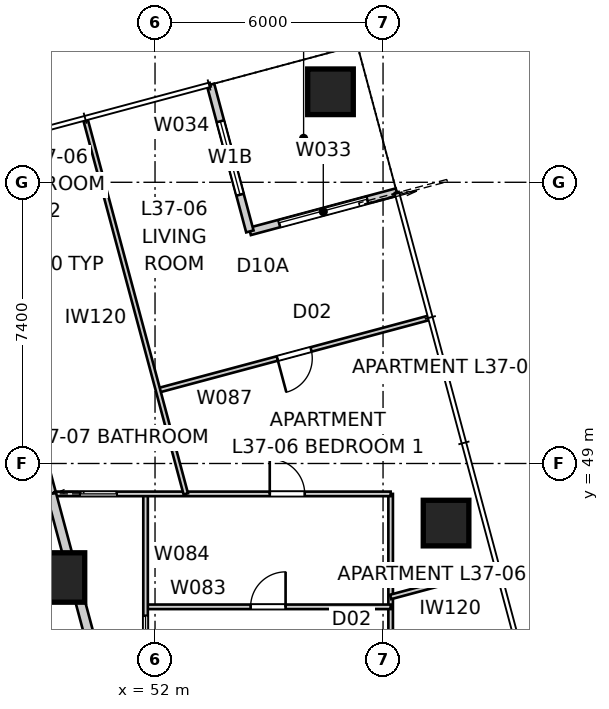
"""IFC4 building model, lengths in metres.
Left out: names, types, materials, properties, quantities, classifications, styles, units other than length and angle.
Written with IfcOpenShell. Run it as: python <this file> out.ifc"""

import sys

from ifc_helpers import new_model, si_unit, direction, frame, frame_2d, origin, origin_2d, place, context, subcontext, project, spatial, rectangle, extrude, element, fill, save


model = new_model("IFC4")
c1 = context("Model", 3, precision=1e-05, world=origin(), true_north=direction((0.0, 1.0)))
c2 = subcontext(c1, "Body", "Model", "MODEL_VIEW")
j1 = project(units=[si_unit("LENGTHUNIT", "METRE"), si_unit("PLANEANGLEUNIT", "RADIAN")], contexts=[c1])
p1 = place(None, origin())
s1 = spatial("IfcSite", under=j1, at=p1, CompositionType="ELEMENT")
p2 = place(p1, origin())
s2 = spatial("IfcBuilding", under=s1, at=p2, CompositionType="ELEMENT")
p3 = place(p2, frame((0.0, 0.0, 135.4)))
s3 = spatial("IfcBuildingStorey", under=s2, at=p3, CompositionType="ELEMENT", Elevation=135.4)
for number, where, z_axis, x_axis in (
    (1, (59.658, 47.432, 0.0), (0.0, 0.0, 1.0), (1.0, 0.0, 0.0)),
    (2, (56.617, 58.781, 0.0), (0.0, 0.0, 1.0), (1.0, 0.0, 0.0)),
):
    element("IfcColumn", number, at=place(p3, frame(where, z_axis=z_axis, x_axis=x_axis)), inside=s3, PredefinedType="COLUMN", context=c2, shape_type="SweptSolid", body=[
        extrude(rectangle(XDim=1.2, YDim=1.2, at=origin_2d()), origin(), (0.0, 0.0, 1.0), 3.2),
    ])
p4 = place(p3, frame((49.5, 46.0, 0.0), z_axis=(0.0, 0.0, 1.0), x_axis=(1.0, 0.0, 0.0)))
e3 = element("IfcColumn", 3, at=p4, inside=s3, PredefinedType="COLUMN", context=c2, shape_type="SweptSolid", body=[
    extrude(rectangle(XDim=1.3, YDim=1.3, at=origin_2d()), origin(), (0.0, 0.0, 1.0), 3.4),
])
p5 = place(p3, frame((58.359, 56.143, 0.0), z_axis=(0.0, 0.0, 1.0), x_axis=(-0.965919172068, -0.258843877716, 0.0)))
e4 = element("IfcWall", 4, at=p5, inside=s3, PredefinedType="SOLIDWALL", context=c2, shape_type="SweptSolid", body=[
    extrude(rectangle(XDim=4.0, YDim=0.2, at=frame_2d((2.0, 0.0))), origin(), (0.0, 0.0, 1.0), 3.2),
])
p6 = place(p5, frame((0.8, 0.0, 0.0)))
e5 = element("IfcOpeningElement", 5, at=p6, cuts=e4, PredefinedType="OPENING", context=c2, shape_type="SweptSolid", body=[
    extrude(rectangle(XDim=2.4, YDim=2.1, at=frame_2d((1.2, 1.05))), frame((0.0, 0.11, 0.0), z_axis=(0.0, -1.0, 0.0), x_axis=(1.0, 0.0, 0.0)), (0.0, 0.0, 1.0), 0.22),
])
p7 = place(p3, frame((54.496, 55.107, 0.0), z_axis=(0.0, 0.0, 1.0), x_axis=(-0.258786931944, 0.965934430412, 0.0)))
e6 = element("IfcWall", 6, at=p7, inside=s3, PredefinedType="SOLIDWALL", context=c2, shape_type="SweptSolid", body=[
    extrude(rectangle(XDim=4.0, YDim=0.2, at=frame_2d((2.0, 0.0))), origin(), (0.0, 0.0, 1.0), 3.2),
])
p8 = place(p7, frame((1.0, 0.0, 0.4)))
e7 = element("IfcOpeningElement", 7, at=p8, cuts=e6, PredefinedType="OPENING", context=c2, shape_type="SweptSolid", body=[
    extrude(rectangle(XDim=2.0, YDim=1.8, at=frame_2d((1.0, 0.9))), frame((0.0, 0.11, 0.0), z_axis=(0.0, -1.0, 0.0), x_axis=(1.0, 0.0, 0.0)), (0.0, 0.0, 1.0), 0.22),
])
p9 = place(p3, frame((47.119, 56.237, 0.0), z_axis=(0.0, 0.0, 1.0), x_axis=(0.258819249667, -0.965925771476, 0.0)))
e8 = element("IfcWall", 8, at=p9, inside=s3, PredefinedType="PARTITIONING", context=c2, shape_type="SweptSolid", body=[
    extrude(rectangle(XDim=8.315, YDim=0.25, at=frame_2d((4.158, 0.0))), origin(), (0.0, 0.0, 1.0), 2.588),
])
p10 = place(p3, frame((49.271, 48.205, 0.0), z_axis=(0.0, 0.0, 1.0), x_axis=(0.258853660469, -0.965916550465, 0.0)))
e9 = element("IfcWall", 9, at=p10, inside=s3, PredefinedType="PARTITIONING", context=c2, shape_type="SweptSolid", body=[
    extrude(rectangle(XDim=4.567, YDim=0.25, at=frame_2d((2.283, 0.0))), origin(), (0.0, 0.0, 1.0), 3.2),
])
p11 = place(p3, frame((58.2, 48.2, 0.0), z_axis=(0.0, 0.0, 1.0), x_axis=(0.0, -1.0, 0.0)))
e10 = element("IfcWall", 10, at=p11, inside=s3, PredefinedType="PARTITIONING", context=c2, shape_type="SweptSolid", body=[
    extrude(rectangle(XDim=33.512, YDim=0.12, at=frame_2d((16.756, 0.0))), origin(), (0.0, 0.0, 1.0), 2.399),
])
p12 = place(p11, frame((11.441, 0.0, 0.0)))
e11 = element("IfcOpeningElement", 11, at=p12, cuts=e10, PredefinedType="OPENING", context=c2, shape_type="SweptSolid", body=[
    extrude(rectangle(XDim=0.92, YDim=2.34, at=frame_2d((0.46, 1.17))), frame((0.0, 0.07, 0.0), z_axis=(0.0, -1.0, 0.0), x_axis=(1.0, 0.0, 0.0)), (0.0, 0.0, 1.0), 0.14),
])
p13 = place(p11, frame((7.583, 0.0, 0.0)))
e12 = element("IfcOpeningElement", 12, at=p13, cuts=e10, PredefinedType="OPENING", context=c2, shape_type="SweptSolid", body=[
    extrude(rectangle(XDim=0.92, YDim=2.34, at=frame_2d((0.46, 1.17))), frame((0.0, 0.07, 0.0), z_axis=(0.0, -1.0, 0.0), x_axis=(1.0, 0.0, 0.0)), (0.0, 0.0, 1.0), 0.14),
])
p14 = place(p11, frame((25.269, 0.0, 0.0)))
e13 = element("IfcOpeningElement", 13, at=p14, cuts=e10, PredefinedType="OPENING", context=c2, shape_type="SweptSolid", body=[
    extrude(rectangle(XDim=0.92, YDim=2.34, at=frame_2d((0.46, 1.17))), frame((0.0, 0.07, 0.0), z_axis=(0.0, -1.0, 0.0), x_axis=(1.0, 0.0, 0.0)), (0.0, 0.0, 1.0), 0.14),
])
p15 = place(p11, frame((28.662, 0.0, 0.0)))
e14 = element("IfcOpeningElement", 14, at=p15, cuts=e10, PredefinedType="OPENING", context=c2, shape_type="SweptSolid", body=[
    extrude(rectangle(XDim=0.92, YDim=2.34, at=frame_2d((0.46, 1.17))), frame((0.0, 0.07, 0.0), z_axis=(0.0, -1.0, 0.0), x_axis=(1.0, 0.0, 0.0)), (0.0, 0.0, 1.0), 0.14),
])
p16 = place(p11, frame((4.15, 0.0, 0.0)))
e15 = element("IfcOpeningElement", 15, at=p16, cuts=e10, PredefinedType="OPENING", context=c2, shape_type="SweptSolid", body=[
    extrude(rectangle(XDim=0.92, YDim=2.34, at=frame_2d((0.46, 1.17))), frame((0.0, 0.07, 0.0), z_axis=(0.0, -1.0, 0.0), x_axis=(1.0, 0.0, 0.0)), (0.0, 0.0, 1.0), 0.14),
])
p17 = place(p3, frame((51.751, 45.228, 0.0), z_axis=(0.0, 0.0, 1.0), x_axis=(1.0, 0.0, 0.0)))
e16 = element("IfcWall", 16, at=p17, inside=s3, PredefinedType="PARTITIONING", context=c2, shape_type="SweptSolid", body=[
    extrude(rectangle(XDim=6.449, YDim=0.12, at=frame_2d((3.225, 0.0))), origin(), (0.0, 0.0, 1.0), 3.2),
])
p18 = place(p17, frame((2.764, 0.0, 0.0)))
e17 = element("IfcOpeningElement", 17, at=p18, cuts=e16, PredefinedType="OPENING", context=c2, shape_type="SweptSolid", body=[
    extrude(rectangle(XDim=0.92, YDim=2.34, at=frame_2d((0.46, 1.17))), frame((0.0, 0.07, 0.0), z_axis=(0.0, -1.0, 0.0), x_axis=(1.0, 0.0, 0.0)), (0.0, 0.0, 1.0), 0.14),
])
p19 = place(p3, frame((51.751, 43.8, 0.0), z_axis=(0.0, 0.0, 1.0), x_axis=(0.0, 1.0, 0.0)))
e18 = element("IfcWall", 18, at=p19, inside=s3, PredefinedType="PARTITIONING", context=c2, shape_type="SweptSolid", body=[
    extrude(rectangle(XDim=4.4, YDim=0.12, at=frame_2d((2.2, 0.0))), origin(), (0.0, 0.0, 1.0), 3.2),
])
p20 = place(p19, frame((0.234, 0.0, 0.0)))
e19 = element("IfcOpeningElement", 19, at=p20, cuts=e18, PredefinedType="OPENING", context=c2, shape_type="SweptSolid", body=[
    extrude(rectangle(XDim=0.96, YDim=2.0, at=frame_2d((0.48, 1.0))), frame((0.0, 0.07, 0.0), z_axis=(0.0, -1.0, 0.0), x_axis=(1.0, 0.0, 0.0)), (0.0, 0.0, 1.0), 0.14),
])
p21 = place(p3, frame((26.657, 48.2, 0.0), z_axis=(0.0, 0.0, 1.0), x_axis=(1.0, 0.0, 0.0)))
e20 = element("IfcWall", 20, at=p21, inside=s3, PredefinedType="PARTITIONING", context=c2, shape_type="SweptSolid", body=[
    extrude(rectangle(XDim=31.543, YDim=0.12, at=frame_2d((15.771, 0.0))), origin(), (0.0, 0.0, 1.0), 2.399),
])
p22 = place(p21, frame((13.4, 0.0, 0.0)))
e21 = element("IfcOpeningElement", 21, at=p22, cuts=e20, PredefinedType="OPENING", context=c2, shape_type="SweptSolid", body=[
    extrude(rectangle(XDim=0.92, YDim=2.34, at=frame_2d((0.46, 1.17))), frame((0.0, 0.07, 0.0), z_axis=(0.0, -1.0, 0.0), x_axis=(1.0, 0.0, 0.0)), (0.0, 0.0, 1.0), 0.14),
])
p23 = place(p21, frame((20.723, 0.0, 0.0)))
e22 = element("IfcOpeningElement", 22, at=p23, cuts=e20, PredefinedType="OPENING", context=c2, shape_type="SweptSolid", body=[
    extrude(rectangle(XDim=0.92, YDim=2.34, at=frame_2d((0.46, 1.17))), frame((0.0, 0.07, 0.0), z_axis=(0.0, -1.0, 0.0), x_axis=(1.0, 0.0, 0.0)), (0.0, 0.0, 1.0), 0.14),
])
p24 = place(p21, frame((10.117, 0.0, 0.0)))
e23 = element("IfcOpeningElement", 23, at=p24, cuts=e20, PredefinedType="OPENING", context=c2, shape_type="SweptSolid", body=[
    extrude(rectangle(XDim=0.96, YDim=2.1, at=frame_2d((0.48, 1.05))), frame((0.0, 0.07, 0.0), z_axis=(0.0, -1.0, 0.0), x_axis=(1.0, 0.0, 0.0)), (0.0, 0.0, 1.0), 0.14),
])
p25 = place(p21, frame((28.362, 0.0, 0.0)))
e24 = element("IfcOpeningElement", 24, at=p25, cuts=e20, PredefinedType="OPENING", context=c2, shape_type="SweptSolid", body=[
    extrude(rectangle(XDim=0.92, YDim=2.34, at=frame_2d((0.46, 1.17))), frame((0.0, 0.07, 0.0), z_axis=(0.0, -1.0, 0.0), x_axis=(1.0, 0.0, 0.0)), (0.0, 0.0, 1.0), 0.14),
])
p26 = place(p21, frame((23.375, 0.0, 0.0)))
e25 = element("IfcOpeningElement", 25, at=p26, cuts=e20, PredefinedType="OPENING", context=c2, shape_type="SweptSolid", body=[
    extrude(rectangle(XDim=0.96, YDim=2.1, at=frame_2d((0.48, 1.05))), frame((0.0, 0.07, 0.0), z_axis=(0.0, -1.0, 0.0), x_axis=(1.0, 0.0, 0.0)), (0.0, 0.0, 1.0), 0.14),
])
p27 = place(p3, frame((59.205, 52.832, 0.0), z_axis=(0.0, 0.0, 1.0), x_axis=(-0.965926630377, -0.258816044185, 0.0)))
e26 = element("IfcWall", 26, at=p27, inside=s3, PredefinedType="PARTITIONING", context=c2, shape_type="SweptSolid", body=[
    extrude(rectangle(XDim=7.377, YDim=0.12, at=frame_2d((3.688, 0.0))), origin(), (0.0, 0.0, 1.0), 3.2),
])
p28 = place(p27, frame((3.208, 0.0, 0.0)))
e27 = element("IfcOpeningElement", 27, at=p28, cuts=e26, PredefinedType="OPENING", context=c2, shape_type="SweptSolid", body=[
    extrude(rectangle(XDim=0.92, YDim=2.34, at=frame_2d((0.46, 1.17))), frame((0.0, 0.07, 0.0), z_axis=(0.0, -1.0, 0.0), x_axis=(1.0, 0.0, 0.0)), (0.0, 0.0, 1.0), 0.14),
])
p29 = place(p3, frame((52.809, 48.2, 0.0), z_axis=(0.0, 0.0, 1.0), x_axis=(-0.258829444594, 0.965923039694, 0.0)))
e28 = element("IfcWall", 28, at=p29, inside=s3, PredefinedType="PARTITIONING", context=c2, shape_type="SweptSolid", body=[
    extrude(rectangle(XDim=10.196, YDim=0.12, at=frame_2d((5.098, 0.0))), origin(), (0.0, 0.0, 1.0), 3.2),
])
p30 = place(p3, frame((60.974, 46.231, 0.0), z_axis=(0.0, 0.0, 1.0), x_axis=(-0.965929456086, -0.258805498136, 0.0)))
e29 = element("IfcWall", 29, at=p30, inside=s3, PredefinedType="PARTITIONING", context=c2, shape_type="SweptSolid", body=[
    extrude(rectangle(XDim=2.872, YDim=0.12, at=frame_2d((1.436, 0.0))), origin(), (0.0, 0.0, 1.0), 3.2),
])
p31 = place(p6, origin())
e30 = element("IfcDoor", 30, at=p31, inside=s3, OperationType="SLIDING_TO_LEFT", PredefinedType="DOOR", context=c2, shape_type="SweptSolid", body=[
    extrude(rectangle(XDim=2.4, YDim=2.1, at=frame_2d((1.2, 1.05))), frame((0.0, 0.025, 0.0), z_axis=(0.0, -1.0, 0.0), x_axis=(1.0, 0.0, 0.0)), (0.0, 0.0, 1.0), 0.05),
])
fill(e5, e30)
p32 = place(p8, origin())
e31 = element("IfcWindow", 31, at=p32, inside=s3, PartitioningType="SINGLE_PANEL", PredefinedType="WINDOW", context=c2, shape_type="SweptSolid", body=[
    extrude(rectangle(XDim=2.0, YDim=1.8, at=frame_2d((1.0, 0.9))), frame((0.0, 0.03, 0.0), z_axis=(0.0, -1.0, 0.0), x_axis=(1.0, 0.0, 0.0)), (0.0, 0.0, 1.0), 0.06),
])
fill(e7, e31)
p33 = place(p18, origin())
e32 = element("IfcDoor", 32, at=p33, inside=s3, OperationType="SINGLE_SWING_RIGHT", PredefinedType="DOOR", context=c2, shape_type="SweptSolid", body=[
    extrude(rectangle(XDim=0.92, YDim=2.34, at=frame_2d((0.46, 1.17))), frame((0.0, 0.025, 0.0), z_axis=(0.0, -1.0, 0.0), x_axis=(1.0, 0.0, 0.0)), (0.0, 0.0, 1.0), 0.05),
])
fill(e17, e32)
p34 = place(p20, origin())
e33 = element("IfcDoor", 33, at=p34, inside=s3, OperationType="SLIDING_TO_LEFT", PredefinedType="DOOR", context=c2, shape_type="SweptSolid", body=[
    extrude(rectangle(XDim=0.96, YDim=2.0, at=frame_2d((0.48, 1.0))), frame((0.0, 0.025, 0.0), z_axis=(0.0, -1.0, 0.0), x_axis=(1.0, 0.0, 0.0)), (0.0, 0.0, 1.0), 0.05),
])
fill(e19, e33)
p35 = place(p25, origin())
e34 = element("IfcDoor", 34, at=p35, inside=s3, OperationType="SINGLE_SWING_LEFT", PredefinedType="DOOR", context=c2, shape_type="SweptSolid", body=[
    extrude(rectangle(XDim=0.92, YDim=2.34, at=frame_2d((0.46, 1.17))), frame((0.0, 0.025, 0.0), z_axis=(0.0, -1.0, 0.0), x_axis=(1.0, 0.0, 0.0)), (0.0, 0.0, 1.0), 0.05),
])
fill(e24, e34)
p36 = place(p26, origin())
e35 = element("IfcDoor", 35, at=p36, inside=s3, OperationType="SLIDING_TO_LEFT", PredefinedType="DOOR", context=c2, shape_type="SweptSolid", body=[
    extrude(rectangle(XDim=0.96, YDim=2.1, at=frame_2d((0.48, 1.05))), frame((0.0, 0.025, 0.0), z_axis=(0.0, -1.0, 0.0), x_axis=(1.0, 0.0, 0.0)), (0.0, 0.0, 1.0), 0.05),
])
fill(e25, e35)
p37 = place(p28, origin())
e36 = element("IfcDoor", 36, at=p37, inside=s3, OperationType="SINGLE_SWING_RIGHT", PredefinedType="DOOR", context=c2, shape_type="SweptSolid", body=[
    extrude(rectangle(XDim=0.92, YDim=2.34, at=frame_2d((0.46, 1.17))), frame((0.0, 0.025, 0.0), z_axis=(0.0, -1.0, 0.0), x_axis=(1.0, 0.0, 0.0)), (0.0, 0.0, 1.0), 0.05),
])
fill(e27, e36)
save(model, sys.argv[1])
